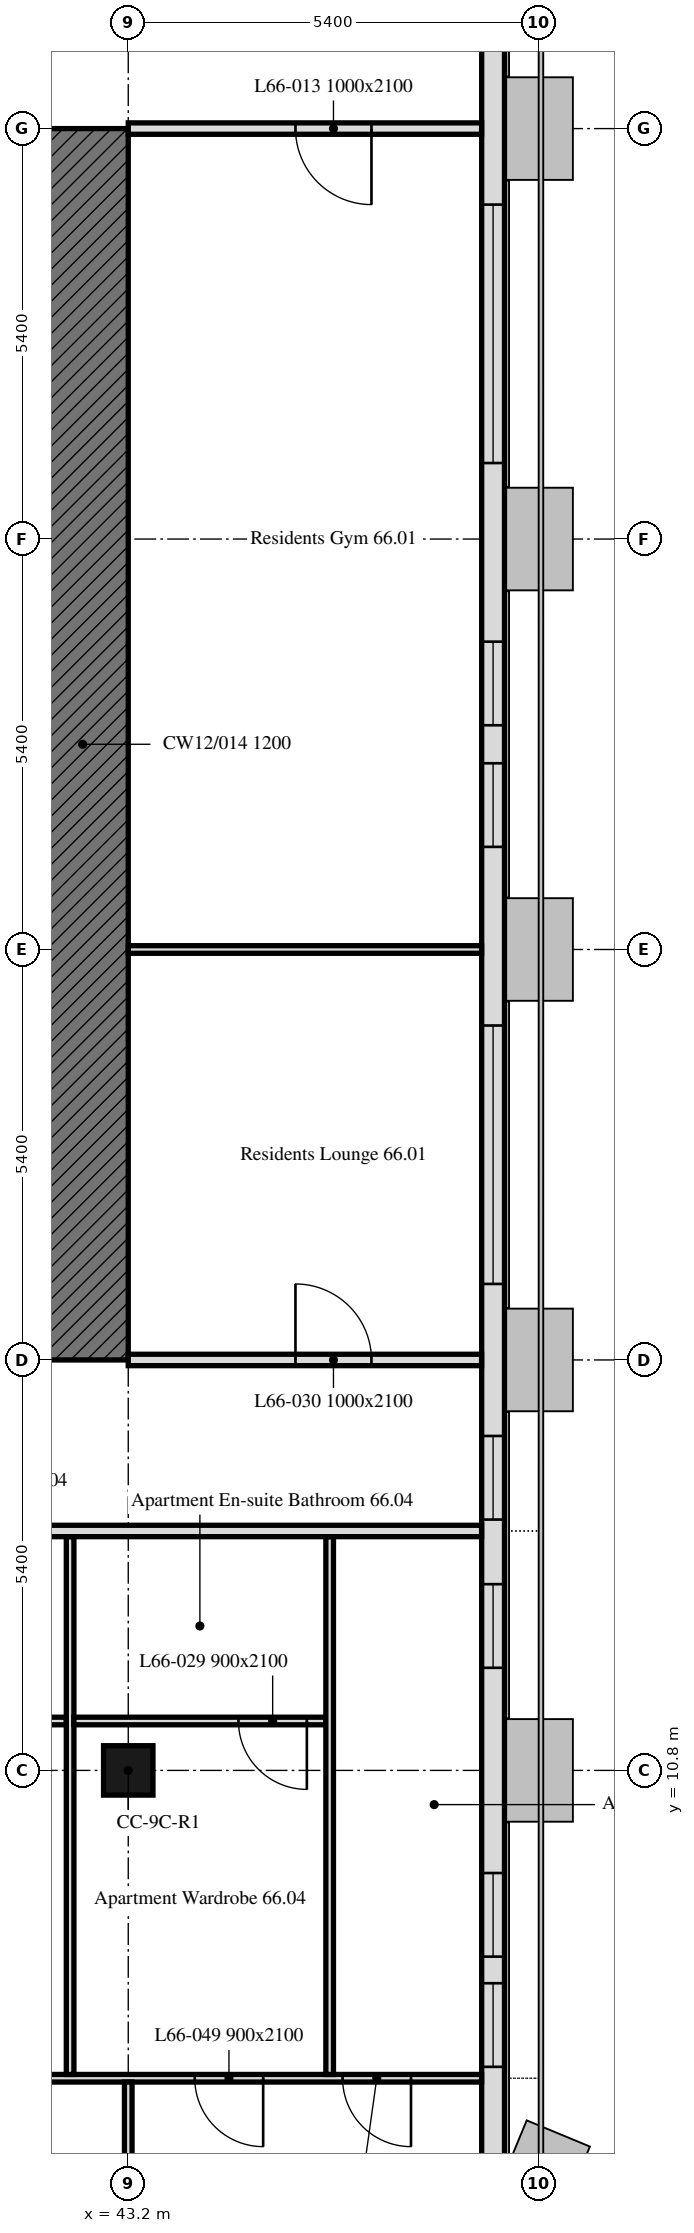
"""IFC4 building model, lengths in metres.
Left out: names, types, materials, properties, quantities, classifications, styles, units other than length and angle.
Written with IfcOpenShell. Run it as: python <this file> out.ifc"""

import sys

from ifc_helpers import new_model, si_unit, direction, frame, frame_2d, origin, origin_2d, place, context, subcontext, project, spatial, rectangle, extrude, element, fill, save


model = new_model("IFC4")
c1 = context("Model", 3, precision=1e-05, world=origin(), true_north=direction((0.0, 1.0)))
c2 = subcontext(c1, "Body", "Model", "MODEL_VIEW")
j1 = project(units=[si_unit("LENGTHUNIT", "METRE"), si_unit("PLANEANGLEUNIT", "RADIAN")], contexts=[c1])
p1 = place(None, origin())
s1 = spatial("IfcSite", under=j1, at=p1, CompositionType="ELEMENT")
p2 = place(p1, origin())
s2 = spatial("IfcBuilding", under=s1, at=p2, CompositionType="ELEMENT")
p3 = place(p2, frame((0.0, 0.0, 271.9)))
s3 = spatial("IfcBuildingStorey", under=s2, at=p3, CompositionType="ELEMENT", Elevation=271.9)
p4 = place(p3, frame((43.2, 10.8, 0.0), z_axis=(0.0, 0.0, 1.0), x_axis=(1.0, 0.0, 0.0)))
e1 = element("IfcColumn", 1, at=p4, inside=s3, PredefinedType="COLUMN", context=c2, shape_type="SweptSolid", body=[
    extrude(rectangle(XDim=0.65, YDim=0.65, at=origin_2d()), origin(), (0.0, 0.0, 1.0), 3.0),
])
p5 = place(p3, frame((48.0, 5.586, 0.0), z_axis=(0.0, 0.0, 1.0), x_axis=(0.0, 1.0, 0.0)))
e2 = element("IfcWall", 2, at=p5, inside=s3, PredefinedType="SOLIDWALL", context=c2, shape_type="SweptSolid", body=[
    extrude(rectangle(XDim=32.027, YDim=0.3, at=frame_2d((16.014, 0.0))), origin(), (0.0, 0.0, 1.0), 3.0),
])
p6 = place(p5, frame((1.314, 0.0, 0.9)))
e3 = element("IfcOpeningElement", 3, at=p6, cuts=e2, PredefinedType="OPENING", context=c2, shape_type="SweptSolid", body=[
    extrude(rectangle(XDim=1.1, YDim=1.7, at=frame_2d((0.55, 0.85))), frame((0.0, 0.16, 0.0), z_axis=(0.0, -1.0, 0.0), x_axis=(1.0, 0.0, 0.0)), (0.0, 0.0, 1.0), 0.32),
])
p7 = place(p5, frame((2.764, 0.0, 0.9)))
e4 = element("IfcOpeningElement", 4, at=p7, cuts=e2, PredefinedType="OPENING", context=c2, shape_type="SweptSolid", body=[
    extrude(rectangle(XDim=1.1, YDim=1.7, at=frame_2d((0.55, 0.85))), frame((0.0, 0.16, 0.0), z_axis=(0.0, -1.0, 0.0), x_axis=(1.0, 0.0, 0.0)), (0.0, 0.0, 1.0), 0.32),
])
p8 = place(p5, frame((6.564, 0.0, 0.9)))
e5 = element("IfcOpeningElement", 5, at=p8, cuts=e2, PredefinedType="OPENING", context=c2, shape_type="SweptSolid", body=[
    extrude(rectangle(XDim=1.1, YDim=1.7, at=frame_2d((0.55, 0.85))), frame((0.0, 0.16, 0.0), z_axis=(0.0, -1.0, 0.0), x_axis=(1.0, 0.0, 0.0)), (0.0, 0.0, 1.0), 0.32),
])
p9 = place(p5, frame((8.514, 0.0, 0.9)))
e6 = element("IfcOpeningElement", 6, at=p9, cuts=e2, PredefinedType="OPENING", context=c2, shape_type="SweptSolid", body=[
    extrude(rectangle(XDim=1.1, YDim=1.7, at=frame_2d((0.55, 0.85))), frame((0.0, 0.16, 0.0), z_axis=(0.0, -1.0, 0.0), x_axis=(1.0, 0.0, 0.0)), (0.0, 0.0, 1.0), 0.32),
])
p10 = place(p5, frame((11.614, 0.0, 0.9)))
e7 = element("IfcOpeningElement", 7, at=p10, cuts=e2, PredefinedType="OPENING", context=c2, shape_type="SweptSolid", body=[
    extrude(rectangle(XDim=3.4, YDim=1.7, at=frame_2d((1.7, 0.85))), frame((0.0, 0.16, 0.0), z_axis=(0.0, -1.0, 0.0), x_axis=(1.0, 0.0, 0.0)), (0.0, 0.0, 1.0), 0.32),
])
p11 = place(p5, frame((17.364, 0.0, 0.9)))
e8 = element("IfcOpeningElement", 8, at=p11, cuts=e2, PredefinedType="OPENING", context=c2, shape_type="SweptSolid", body=[
    extrude(rectangle(XDim=1.1, YDim=1.7, at=frame_2d((0.55, 0.85))), frame((0.0, 0.16, 0.0), z_axis=(0.0, -1.0, 0.0), x_axis=(1.0, 0.0, 0.0)), (0.0, 0.0, 1.0), 0.32),
])
p12 = place(p5, frame((18.964, 0.0, 0.9)))
e9 = element("IfcOpeningElement", 9, at=p12, cuts=e2, PredefinedType="OPENING", context=c2, shape_type="SweptSolid", body=[
    extrude(rectangle(XDim=1.1, YDim=1.7, at=frame_2d((0.55, 0.85))), frame((0.0, 0.16, 0.0), z_axis=(0.0, -1.0, 0.0), x_axis=(1.0, 0.0, 0.0)), (0.0, 0.0, 1.0), 0.32),
])
p13 = place(p5, frame((22.414, 0.0, 0.9)))
e10 = element("IfcOpeningElement", 10, at=p13, cuts=e2, PredefinedType="OPENING", context=c2, shape_type="SweptSolid", body=[
    extrude(rectangle(XDim=3.4, YDim=1.7, at=frame_2d((1.7, 0.85))), frame((0.0, 0.16, 0.0), z_axis=(0.0, -1.0, 0.0), x_axis=(1.0, 0.0, 0.0)), (0.0, 0.0, 1.0), 0.32),
])
p14 = place(p5, frame((28.239, 0.0, 0.9)))
e11 = element("IfcOpeningElement", 11, at=p14, cuts=e2, PredefinedType="OPENING", context=c2, shape_type="SweptSolid", body=[
    extrude(rectangle(XDim=0.65, YDim=1.7, at=frame_2d((0.325, 0.85))), frame((0.0, 0.16, 0.0), z_axis=(0.0, -1.0, 0.0), x_axis=(1.0, 0.0, 0.0)), (0.0, 0.0, 1.0), 0.32),
])
p15 = place(p5, frame((29.764, 0.0, 0.9)))
e12 = element("IfcOpeningElement", 12, at=p15, cuts=e2, PredefinedType="OPENING", context=c2, shape_type="SweptSolid", body=[
    extrude(rectangle(XDim=1.1, YDim=1.7, at=frame_2d((0.55, 0.85))), frame((0.0, 0.16, 0.0), z_axis=(0.0, -1.0, 0.0), x_axis=(1.0, 0.0, 0.0)), (0.0, 0.0, 1.0), 0.32),
])
p16 = place(p3, frame((42.6, 32.4, 0.0), z_axis=(0.0, 0.0, 1.0), x_axis=(0.0, -1.0, 0.0)))
e13 = element("IfcWall", 13, at=p16, inside=s3, PredefinedType="SOLIDWALL", context=c2, shape_type="SweptSolid", body=[
    extrude(rectangle(XDim=16.2, YDim=1.2, at=frame_2d((8.1, 0.0))), origin(), (0.0, 0.0, 1.0), 3.0),
])
p17 = place(p3, frame((47.849, 32.4, 0.0), z_axis=(0.0, 0.0, 1.0), x_axis=(-1.0, 0.0, 0.0)))
e14 = element("IfcWall", 14, at=p17, inside=s3, PredefinedType="PARTITIONING", context=c2, shape_type="SweptSolid", body=[
    extrude(rectangle(XDim=4.649, YDim=0.15, at=frame_2d((2.325, 0.0))), origin(), (0.0, 0.0, 1.0), 2.4),
])
p18 = place(p17, frame((1.449, 0.0, 0.0)))
e15 = element("IfcOpeningElement", 15, at=p18, cuts=e14, PredefinedType="OPENING", context=c2, shape_type="SweptSolid", body=[
    extrude(rectangle(XDim=1.0, YDim=2.1, at=frame_2d((0.5, 1.05))), frame((0.0, 0.075, 0.0), z_axis=(0.0, -1.0, 0.0), x_axis=(1.0, 0.0, 0.0)), (0.0, 0.0, 1.0), 0.15),
])
p19 = place(p3, frame((43.2, 21.6, 0.0), z_axis=(0.0, 0.0, 1.0), x_axis=(1.0, 0.0, 0.0)))
e16 = element("IfcWall", 16, at=p19, inside=s3, PredefinedType="PARTITIONING", context=c2, shape_type="SweptSolid", body=[
    extrude(rectangle(XDim=4.649, YDim=0.1, at=frame_2d((2.325, 0.0))), origin(), (0.0, 0.0, 1.0), 2.4),
])
p20 = place(p3, frame((47.849, 6.75, 0.0), z_axis=(0.0, 0.0, 1.0), x_axis=(-1.0, 0.0, 0.0)))
e17 = element("IfcWall", 17, at=p20, inside=s3, PredefinedType="PARTITIONING", context=c2, shape_type="SweptSolid", body=[
    extrude(rectangle(XDim=15.374, YDim=0.1, at=frame_2d((7.687, 0.0))), origin(), (0.0, 0.0, 1.0), 2.4),
])
p21 = place(p20, frame((0.929, 0.0, 0.0)))
e18 = element("IfcOpeningElement", 18, at=p21, cuts=e17, PredefinedType="OPENING", context=c2, shape_type="SweptSolid", body=[
    extrude(rectangle(XDim=0.9, YDim=2.1, at=frame_2d((0.45, 1.05))), frame((0.0, 0.05, 0.0), z_axis=(0.0, -1.0, 0.0), x_axis=(1.0, 0.0, 0.0)), (0.0, 0.0, 1.0), 0.1),
])
p22 = place(p20, frame((13.149, 0.0, 0.0)))
e19 = element("IfcOpeningElement", 19, at=p22, cuts=e17, PredefinedType="OPENING", context=c2, shape_type="SweptSolid", body=[
    extrude(rectangle(XDim=0.9, YDim=2.1, at=frame_2d((0.45, 1.05))), frame((0.0, 0.05, 0.0), z_axis=(0.0, -1.0, 0.0), x_axis=(1.0, 0.0, 0.0)), (0.0, 0.0, 1.0), 0.1),
])
p23 = place(p20, frame((2.874, 0.0, 0.0)))
e20 = element("IfcOpeningElement", 20, at=p23, cuts=e17, PredefinedType="OPENING", context=c2, shape_type="SweptSolid", body=[
    extrude(rectangle(XDim=0.9, YDim=2.1, at=frame_2d((0.45, 1.05))), frame((0.0, 0.05, 0.0), z_axis=(0.0, -1.0, 0.0), x_axis=(1.0, 0.0, 0.0)), (0.0, 0.0, 1.0), 0.1),
])
p24 = place(p20, frame((8.463, 0.0, 0.0)))
e21 = element("IfcOpeningElement", 21, at=p24, cuts=e17, PredefinedType="OPENING", context=c2, shape_type="SweptSolid", body=[
    extrude(rectangle(XDim=0.9, YDim=2.1, at=frame_2d((0.45, 1.05))), frame((0.0, 0.05, 0.0), z_axis=(0.0, -1.0, 0.0), x_axis=(1.0, 0.0, 0.0)), (0.0, 0.0, 1.0), 0.1),
])
p25 = place(p3, frame((43.2, 1.112, 0.0), z_axis=(0.0, 0.0, 1.0), x_axis=(0.0, 1.0, 0.0)))
e22 = element("IfcWall", 22, at=p25, inside=s3, PredefinedType="PARTITIONING", context=c2, shape_type="SweptSolid", body=[
    extrude(rectangle(XDim=5.588, YDim=0.1, at=frame_2d((2.794, 0.0))), origin(), (0.0, 0.0, 1.0), 3.0),
])
p26 = place(p25, frame((1.813, 0.0, 0.0)))
e23 = element("IfcOpeningElement", 23, at=p26, cuts=e22, PredefinedType="OPENING", context=c2, shape_type="SweptSolid", body=[
    extrude(rectangle(XDim=0.9, YDim=2.1, at=frame_2d((0.45, 1.05))), frame((0.0, 0.05, 0.0), z_axis=(0.0, -1.0, 0.0), x_axis=(1.0, 0.0, 0.0)), (0.0, 0.0, 1.0), 0.1),
])
p27 = place(p3, frame((42.385, 11.45, 0.0), z_axis=(0.0, 0.0, 1.0), x_axis=(-1.0, 0.0, 0.0)))
e24 = element("IfcWall", 24, at=p27, inside=s3, PredefinedType="PARTITIONING", context=c2, shape_type="SweptSolid", body=[
    extrude(rectangle(XDim=2.779, YDim=0.1, at=frame_2d((1.39, 0.0))), origin(), (0.0, 0.0, 1.0), 3.0),
])
p28 = place(p3, frame((42.435, 6.8, 0.0), z_axis=(0.0, 0.0, 1.0), x_axis=(0.0, 1.0, 0.0)))
e25 = element("IfcWall", 25, at=p28, inside=s3, PredefinedType="PARTITIONING", context=c2, shape_type="SweptSolid", body=[
    extrude(rectangle(XDim=7.075, YDim=0.1, at=frame_2d((3.538, 0.0))), origin(), (0.0, 0.0, 1.0), 2.4),
])
p29 = place(p3, frame((45.8, 11.45, 0.0), z_axis=(0.0, 0.0, 1.0), x_axis=(-1.0, 0.0, 0.0)))
e26 = element("IfcWall", 26, at=p29, inside=s3, PredefinedType="PARTITIONING", context=c2, shape_type="SweptSolid", body=[
    extrude(rectangle(XDim=3.315, YDim=0.1, at=frame_2d((1.657, 0.0))), origin(), (0.0, 0.0, 1.0), 3.0),
])
p30 = place(p29, frame((0.25, 0.0, 0.0)))
e27 = element("IfcOpeningElement", 27, at=p30, cuts=e26, PredefinedType="OPENING", context=c2, shape_type="SweptSolid", body=[
    extrude(rectangle(XDim=0.9, YDim=2.1, at=frame_2d((0.45, 1.05))), frame((0.0, 0.05, 0.0), z_axis=(0.0, -1.0, 0.0), x_axis=(1.0, 0.0, 0.0)), (0.0, 0.0, 1.0), 0.1),
])
p31 = place(p3, frame((45.85, 6.8, 0.0), z_axis=(0.0, 0.0, 1.0), x_axis=(0.0, 1.0, 0.0)))
e28 = element("IfcWall", 28, at=p31, inside=s3, PredefinedType="PARTITIONING", context=c2, shape_type="SweptSolid", body=[
    extrude(rectangle(XDim=7.075, YDim=0.1, at=frame_2d((3.538, 0.0))), origin(), (0.0, 0.0, 1.0), 2.4),
])
p32 = place(p3, frame((47.849, 13.95, 0.0), z_axis=(0.0, 0.0, 1.0), x_axis=(-1.0, 0.0, 0.0)))
e29 = element("IfcWall", 29, at=p32, inside=s3, PredefinedType="PARTITIONING", context=c2, shape_type="SweptSolid", body=[
    extrude(rectangle(XDim=41.698, YDim=0.15, at=frame_2d((20.849, 0.0))), origin(), (0.0, 0.0, 1.0), 2.4),
])
p33 = place(p32, frame((37.749, 0.0, 0.0)))
e30 = element("IfcOpeningElement", 30, at=p33, cuts=e29, PredefinedType="OPENING", context=c2, shape_type="SweptSolid", body=[
    extrude(rectangle(XDim=1.0, YDim=2.1, at=frame_2d((0.5, 1.05))), frame((0.0, 0.075, 0.0), z_axis=(0.0, -1.0, 0.0), x_axis=(1.0, 0.0, 0.0)), (0.0, 0.0, 1.0), 0.15),
])
p34 = place(p32, frame((32.962, 0.0, 0.0)))
e31 = element("IfcOpeningElement", 31, at=p34, cuts=e29, PredefinedType="OPENING", context=c2, shape_type="SweptSolid", body=[
    extrude(rectangle(XDim=1.0, YDim=2.1, at=frame_2d((0.5, 1.05))), frame((0.0, 0.075, 0.0), z_axis=(0.0, -1.0, 0.0), x_axis=(1.0, 0.0, 0.0)), (0.0, 0.0, 1.0), 0.15),
])
p35 = place(p32, frame((22.179, 0.0, 0.0)))
e32 = element("IfcOpeningElement", 32, at=p35, cuts=e29, PredefinedType="OPENING", context=c2, shape_type="SweptSolid", body=[
    extrude(rectangle(XDim=1.0, YDim=2.1, at=frame_2d((0.5, 1.05))), frame((0.0, 0.075, 0.0), z_axis=(0.0, -1.0, 0.0), x_axis=(1.0, 0.0, 0.0)), (0.0, 0.0, 1.0), 0.15),
])
p36 = place(p32, frame((9.193, 0.0, 0.0)))
e33 = element("IfcOpeningElement", 33, at=p36, cuts=e29, PredefinedType="OPENING", context=c2, shape_type="SweptSolid", body=[
    extrude(rectangle(XDim=1.0, YDim=2.1, at=frame_2d((0.5, 1.05))), frame((0.0, 0.075, 0.0), z_axis=(0.0, -1.0, 0.0), x_axis=(1.0, 0.0, 0.0)), (0.0, 0.0, 1.0), 0.15),
])
p37 = place(p3, frame((43.2, 16.2, 0.0), z_axis=(0.0, 0.0, 1.0), x_axis=(1.0, 0.0, 0.0)))
e34 = element("IfcWall", 34, at=p37, inside=s3, PredefinedType="PARTITIONING", context=c2, shape_type="SweptSolid", body=[
    extrude(rectangle(XDim=4.649, YDim=0.15, at=frame_2d((2.325, 0.0))), origin(), (0.0, 0.0, 1.0), 2.4),
])
p38 = place(p37, frame((2.2, 0.0, 0.0)))
e35 = element("IfcOpeningElement", 35, at=p38, cuts=e34, PredefinedType="OPENING", context=c2, shape_type="SweptSolid", body=[
    extrude(rectangle(XDim=1.0, YDim=2.1, at=frame_2d((0.5, 1.05))), frame((0.0, 0.075, 0.0), z_axis=(0.0, -1.0, 0.0), x_axis=(1.0, 0.0, 0.0)), (0.0, 0.0, 1.0), 0.15),
])
p39 = place(p6, origin())
e36 = element("IfcWindow", 36, at=p39, inside=s3, PartitioningType="SINGLE_PANEL", PredefinedType="WINDOW", context=c2, shape_type="SweptSolid", body=[
    extrude(rectangle(XDim=1.1, YDim=1.7, at=frame_2d((0.55, 0.85))), frame((0.0, 0.03, 0.0), z_axis=(0.0, -1.0, 0.0), x_axis=(1.0, 0.0, 0.0)), (0.0, 0.0, 1.0), 0.06),
])
fill(e3, e36)
p40 = place(p7, origin())
e37 = element("IfcWindow", 37, at=p40, inside=s3, PartitioningType="SINGLE_PANEL", PredefinedType="WINDOW", context=c2, shape_type="SweptSolid", body=[
    extrude(rectangle(XDim=1.1, YDim=1.7, at=frame_2d((0.55, 0.85))), frame((0.0, 0.03, 0.0), z_axis=(0.0, -1.0, 0.0), x_axis=(1.0, 0.0, 0.0)), (0.0, 0.0, 1.0), 0.06),
])
fill(e4, e37)
p41 = place(p8, origin())
e38 = element("IfcWindow", 38, at=p41, inside=s3, PartitioningType="SINGLE_PANEL", PredefinedType="WINDOW", context=c2, shape_type="SweptSolid", body=[
    extrude(rectangle(XDim=1.1, YDim=1.7, at=frame_2d((0.55, 0.85))), frame((0.0, 0.03, 0.0), z_axis=(0.0, -1.0, 0.0), x_axis=(1.0, 0.0, 0.0)), (0.0, 0.0, 1.0), 0.06),
])
fill(e5, e38)
p42 = place(p9, origin())
e39 = element("IfcWindow", 39, at=p42, inside=s3, PartitioningType="SINGLE_PANEL", PredefinedType="WINDOW", context=c2, shape_type="SweptSolid", body=[
    extrude(rectangle(XDim=1.1, YDim=1.7, at=frame_2d((0.55, 0.85))), frame((0.0, 0.03, 0.0), z_axis=(0.0, -1.0, 0.0), x_axis=(1.0, 0.0, 0.0)), (0.0, 0.0, 1.0), 0.06),
])
fill(e6, e39)
p43 = place(p10, origin())
e40 = element("IfcWindow", 40, at=p43, inside=s3, PartitioningType="SINGLE_PANEL", PredefinedType="WINDOW", context=c2, shape_type="SweptSolid", body=[
    extrude(rectangle(XDim=3.4, YDim=1.7, at=frame_2d((1.7, 0.85))), frame((0.0, 0.03, 0.0), z_axis=(0.0, -1.0, 0.0), x_axis=(1.0, 0.0, 0.0)), (0.0, 0.0, 1.0), 0.06),
])
fill(e7, e40)
p44 = place(p11, origin())
e41 = element("IfcWindow", 41, at=p44, inside=s3, PartitioningType="SINGLE_PANEL", PredefinedType="WINDOW", context=c2, shape_type="SweptSolid", body=[
    extrude(rectangle(XDim=1.1, YDim=1.7, at=frame_2d((0.55, 0.85))), frame((0.0, 0.03, 0.0), z_axis=(0.0, -1.0, 0.0), x_axis=(1.0, 0.0, 0.0)), (0.0, 0.0, 1.0), 0.06),
])
fill(e8, e41)
p45 = place(p12, origin())
e42 = element("IfcWindow", 42, at=p45, inside=s3, PartitioningType="SINGLE_PANEL", PredefinedType="WINDOW", context=c2, shape_type="SweptSolid", body=[
    extrude(rectangle(XDim=1.1, YDim=1.7, at=frame_2d((0.55, 0.85))), frame((0.0, 0.03, 0.0), z_axis=(0.0, -1.0, 0.0), x_axis=(1.0, 0.0, 0.0)), (0.0, 0.0, 1.0), 0.06),
])
fill(e9, e42)
p46 = place(p13, origin())
e43 = element("IfcWindow", 43, at=p46, inside=s3, PartitioningType="SINGLE_PANEL", PredefinedType="WINDOW", context=c2, shape_type="SweptSolid", body=[
    extrude(rectangle(XDim=3.4, YDim=1.7, at=frame_2d((1.7, 0.85))), frame((0.0, 0.03, 0.0), z_axis=(0.0, -1.0, 0.0), x_axis=(1.0, 0.0, 0.0)), (0.0, 0.0, 1.0), 0.06),
])
fill(e10, e43)
p47 = place(p18, origin())
e44 = element("IfcDoor", 44, at=p47, inside=s3, OperationType="SINGLE_SWING_LEFT", PredefinedType="DOOR", context=c2, shape_type="SweptSolid", body=[
    extrude(rectangle(XDim=1.0, YDim=2.1, at=frame_2d((0.5, 1.05))), frame((0.0, 0.025, 0.0), z_axis=(0.0, -1.0, 0.0), x_axis=(1.0, 0.0, 0.0)), (0.0, 0.0, 1.0), 0.05),
])
fill(e15, e44)
p48 = place(p21, origin())
e45 = element("IfcDoor", 45, at=p48, inside=s3, OperationType="SINGLE_SWING_LEFT", PredefinedType="DOOR", context=c2, shape_type="SweptSolid", body=[
    extrude(rectangle(XDim=0.9, YDim=2.1, at=frame_2d((0.45, 1.05))), frame((0.0, 0.025, 0.0), z_axis=(0.0, -1.0, 0.0), x_axis=(1.0, 0.0, 0.0)), (0.0, 0.0, 1.0), 0.05),
])
fill(e18, e45)
p49 = place(p30, origin())
e46 = element("IfcDoor", 46, at=p49, inside=s3, OperationType="SINGLE_SWING_LEFT", PredefinedType="DOOR", context=c2, shape_type="SweptSolid", body=[
    extrude(rectangle(XDim=0.9, YDim=2.1, at=frame_2d((0.45, 1.05))), frame((0.0, 0.025, 0.0), z_axis=(0.0, -1.0, 0.0), x_axis=(1.0, 0.0, 0.0)), (0.0, 0.0, 1.0), 0.05),
])
fill(e27, e46)
p50 = place(p38, origin())
e47 = element("IfcDoor", 47, at=p50, inside=s3, OperationType="SINGLE_SWING_LEFT", PredefinedType="DOOR", context=c2, shape_type="SweptSolid", body=[
    extrude(rectangle(XDim=1.0, YDim=2.1, at=frame_2d((0.5, 1.05))), frame((0.0, 0.025, 0.0), z_axis=(0.0, -1.0, 0.0), x_axis=(1.0, 0.0, 0.0)), (0.0, 0.0, 1.0), 0.05),
])
fill(e35, e47)
p51 = place(p23, origin())
e48 = element("IfcDoor", 48, at=p51, inside=s3, OperationType="SINGLE_SWING_RIGHT", PredefinedType="DOOR", context=c2, shape_type="SweptSolid", body=[
    extrude(rectangle(XDim=0.9, YDim=2.1, at=frame_2d((0.45, 1.05))), frame((0.0, 0.025, 0.0), z_axis=(0.0, -1.0, 0.0), x_axis=(1.0, 0.0, 0.0)), (0.0, 0.0, 1.0), 0.05),
])
fill(e20, e48)
save(model, sys.argv[1])
